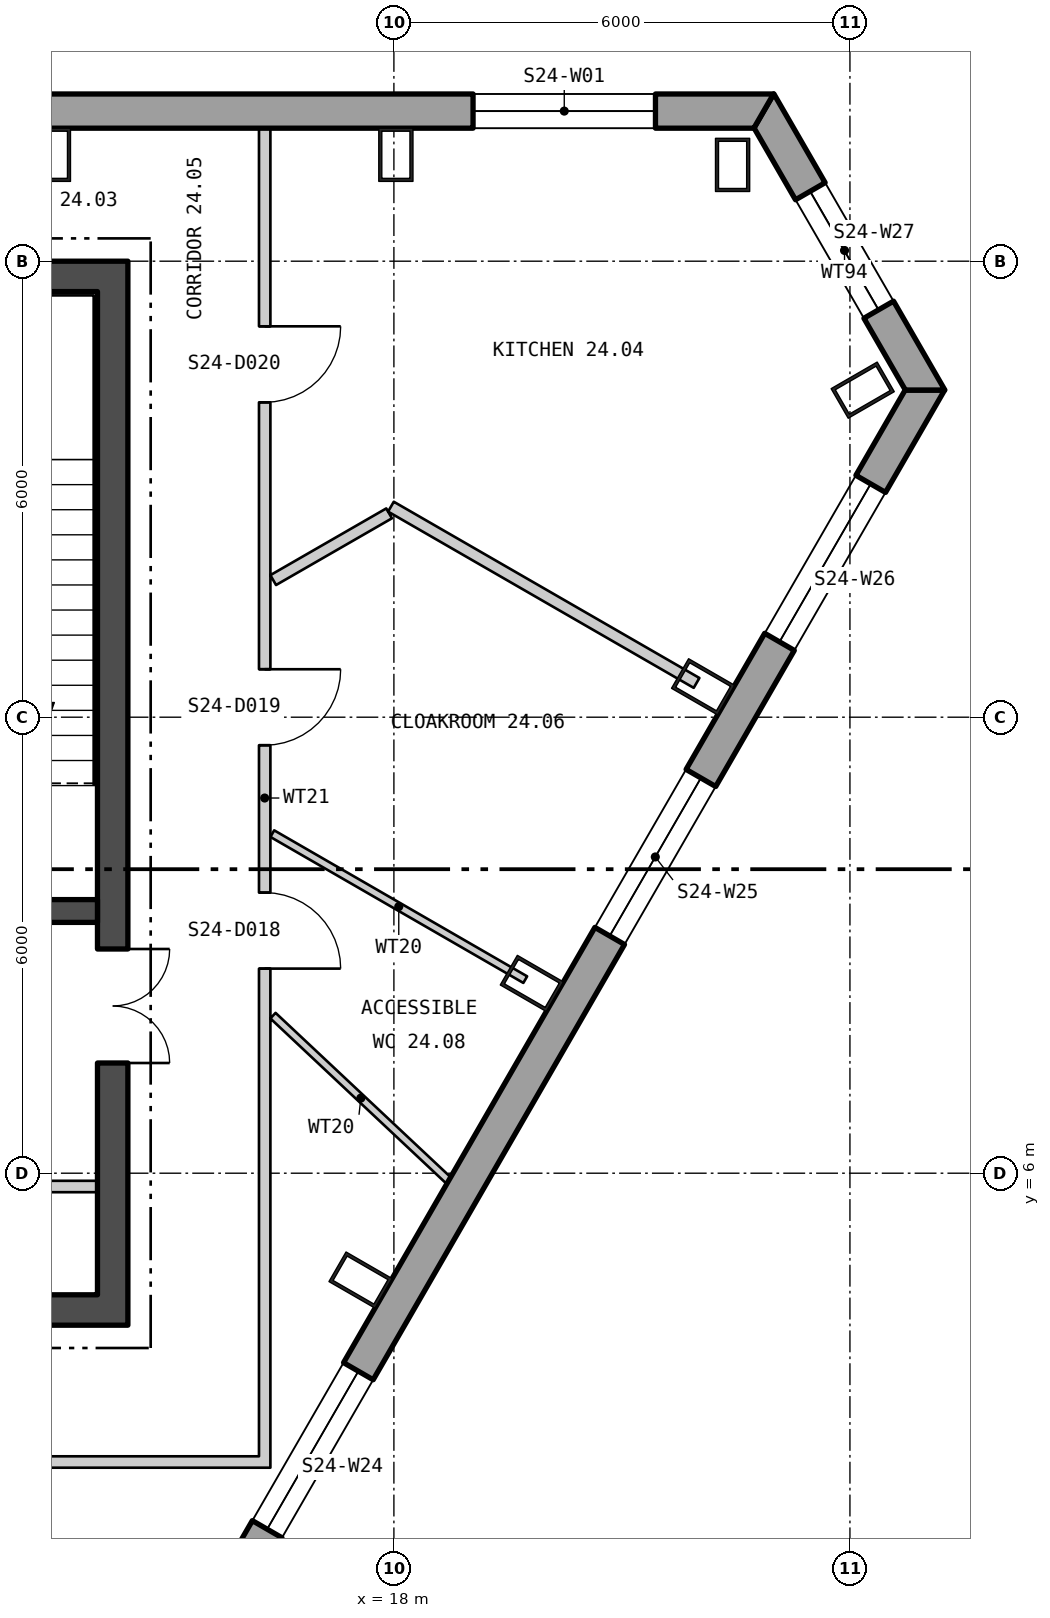
"""IFC4 building model, lengths in metres.
Left out: names, types, materials, properties, quantities, classifications, styles, units other than length and angle.
Written with IfcOpenShell. Run it as: python <this file> out.ifc"""

import sys

from ifc_helpers import new_model, si_unit, direction, frame, frame_2d, origin, origin_2d, place, context, subcontext, project, spatial, polyline, rectangle, hollow_rectangle, outline, extrude, element, fill, save


model = new_model("IFC4")
c1 = context("Model", 3, precision=1e-05, world=origin(), true_north=direction((0.0, 1.0)))
c2 = subcontext(c1, "Body", "Model", "MODEL_VIEW")
j1 = project(units=[si_unit("LENGTHUNIT", "METRE"), si_unit("PLANEANGLEUNIT", "RADIAN")], contexts=[c1])
p1 = place(None, origin())
s1 = spatial("IfcSite", under=j1, at=p1, CompositionType="ELEMENT")
p2 = place(p1, origin())
s2 = spatial("IfcBuilding", under=s1, at=p2, CompositionType="ELEMENT")
p3 = place(p2, frame((0.0, 0.0, 312.6)))
s3 = spatial("IfcBuildingStorey", under=s2, at=p3, CompositionType="ELEMENT", Elevation=312.6)
for number, where, z_axis, x_axis in (
    (1, (22.456, 19.267, 0.0), (0.0, 0.0, 1.0), (-1.0, 0.0, 0.0)),
    (2, (18.026, 19.4, 0.0), (0.0, 0.0, 1.0), (-1.0, 0.0, 0.0)),
    (3, (13.52, 19.4, 0.0), (0.0, 0.0, 1.0), (-1.0, 0.0, 0.0)),
    (4, (17.561, 4.594, 0.0), (0.0, 0.0, 1.0), (0.5, 0.866, 0.0)),
    (5, (19.815, 8.497, 0.0), (0.0, 0.0, 1.0), (0.5, 0.866, 0.0)),
    (6, (22.068, 12.4, 0.0), (0.0, 0.0, 1.0), (0.5, 0.866, 0.0)),
    (7, (24.168, 16.303, 0.0), (0.0, 0.0, 1.0), (-0.5, 0.866, 0.0)),
):
    element("IfcColumn", number, at=place(p3, frame(where, z_axis=z_axis, x_axis=x_axis)), inside=s3, PredefinedType="COLUMN", context=c2, shape_type="SweptSolid", body=[
        extrude(hollow_rectangle(XDim=0.45, YDim=0.7, WallThickness=0.04, at=origin_2d()), origin(), (0.0, 0.0, 1.0), 4.2),
    ])
p4 = place(p3, frame((22.865, 19.975, -0.4), z_axis=(0.0, 0.0, 1.0), x_axis=(-1.0, 0.0, 0.0)))
e8 = element("IfcWall", 8, at=p4, inside=s3, PredefinedType="SOLIDWALL", context=c2, shape_type="SweptSolid", body=[
    extrude(outline(polyline([(-0.13, -0.225), (45.86, -0.225), (45.6, 0.225), (0.13, 0.225), (-0.13, -0.225)])), origin(), (0.0, 0.0, 1.0), 4.2),
])
p5 = place(p4, frame((1.424, 0.0, 1.3)))
e9 = element("IfcOpeningElement", 9, at=p5, cuts=e8, PredefinedType="OPENING", context=c2, shape_type="SweptSolid", body=[
    extrude(rectangle(XDim=2.4, YDim=2.3, at=frame_2d((1.2, 1.15))), frame((0.0, 0.235, 0.0), z_axis=(0.0, -1.0, 0.0), x_axis=(1.0, 0.0, 0.0)), (0.0, 0.0, 1.0), 0.47),
])
p6 = place(p4, frame((14.905, 0.0, 1.3)))
e10 = element("IfcOpeningElement", 10, at=p6, cuts=e8, PredefinedType="OPENING", context=c2, shape_type="SweptSolid", body=[
    extrude(rectangle(XDim=2.4, YDim=2.3, at=frame_2d((1.2, 1.15))), frame((0.0, 0.235, 0.0), z_axis=(0.0, -1.0, 0.0), x_axis=(1.0, 0.0, 0.0)), (0.0, 0.0, 1.0), 0.47),
])
p7 = place(p4, frame((19.412, 0.0, 1.3)))
e11 = element("IfcOpeningElement", 11, at=p7, cuts=e8, PredefinedType="OPENING", context=c2, shape_type="SweptSolid", body=[
    extrude(rectangle(XDim=2.4, YDim=2.3, at=frame_2d((1.2, 1.15))), frame((0.0, 0.235, 0.0), z_axis=(0.0, -1.0, 0.0), x_axis=(1.0, 0.0, 0.0)), (0.0, 0.0, 1.0), 0.47),
])
p8 = place(p4, frame((23.918, 0.0, 1.3)))
e12 = element("IfcOpeningElement", 12, at=p8, cuts=e8, PredefinedType="OPENING", context=c2, shape_type="SweptSolid", body=[
    extrude(rectangle(XDim=2.4, YDim=2.3, at=frame_2d((1.2, 1.15))), frame((0.0, 0.235, 0.0), z_axis=(0.0, -1.0, 0.0), x_axis=(1.0, 0.0, 0.0)), (0.0, 0.0, 1.0), 0.47),
])
p9 = place(p4, frame((28.425, 0.0, 1.3)))
e13 = element("IfcOpeningElement", 13, at=p9, cuts=e8, PredefinedType="OPENING", context=c2, shape_type="SweptSolid", body=[
    extrude(rectangle(XDim=2.4, YDim=2.3, at=frame_2d((1.2, 1.15))), frame((0.0, 0.235, 0.0), z_axis=(0.0, -1.0, 0.0), x_axis=(1.0, 0.0, 0.0)), (0.0, 0.0, 1.0), 0.47),
])
p10 = place(p4, frame((32.932, 0.0, 1.3)))
e14 = element("IfcOpeningElement", 14, at=p10, cuts=e8, PredefinedType="OPENING", context=c2, shape_type="SweptSolid", body=[
    extrude(rectangle(XDim=2.4, YDim=2.3, at=frame_2d((1.2, 1.15))), frame((0.0, 0.235, 0.0), z_axis=(0.0, -1.0, 0.0), x_axis=(1.0, 0.0, 0.0)), (0.0, 0.0, 1.0), 0.47),
])
p11 = place(p4, frame((41.907, 0.0, 1.3)))
e15 = element("IfcOpeningElement", 15, at=p11, cuts=e8, PredefinedType="OPENING", context=c2, shape_type="SweptSolid", body=[
    extrude(rectangle(XDim=2.4, YDim=2.3, at=frame_2d((1.2, 1.15))), frame((0.0, 0.235, 0.0), z_axis=(0.0, -1.0, 0.0), x_axis=(1.0, 0.0, 0.0)), (0.0, 0.0, 1.0), 0.47),
])
p12 = place(p3, frame((2.12, -23.301, -0.18), z_axis=(0.0, 0.0, 1.0), x_axis=(0.500000141277, 0.866025322218, 0.0)))
e16 = element("IfcWall", 16, at=p12, inside=s3, PredefinedType="SOLIDWALL", context=c2, shape_type="SweptSolid", body=[
    extrude(outline(polyline([(-0.13, -0.225), (45.86, -0.225), (45.6, 0.225), (0.13, 0.225), (-0.13, -0.225)])), origin(), (0.0, 0.0, 1.0), 3.98),
])
p13 = place(p12, frame((1.424, 0.0, 1.08)))
e17 = element("IfcOpeningElement", 17, at=p13, cuts=e16, PredefinedType="OPENING", context=c2, shape_type="SweptSolid", body=[
    extrude(rectangle(XDim=2.4, YDim=2.3, at=frame_2d((1.2, 1.15))), frame((0.0, 0.235, 0.0), z_axis=(0.0, -1.0, 0.0), x_axis=(1.0, 0.0, 0.0)), (0.0, 0.0, 1.0), 0.47),
])
p14 = place(p12, frame((5.892, 0.0, 1.08)))
e18 = element("IfcOpeningElement", 18, at=p14, cuts=e16, PredefinedType="OPENING", context=c2, shape_type="SweptSolid", body=[
    extrude(rectangle(XDim=2.4, YDim=2.3, at=frame_2d((1.2, 1.15))), frame((0.0, 0.235, 0.0), z_axis=(0.0, -1.0, 0.0), x_axis=(1.0, 0.0, 0.0)), (0.0, 0.0, 1.0), 0.47),
])
p15 = place(p12, frame((14.905, 0.0, 1.08)))
e19 = element("IfcOpeningElement", 19, at=p15, cuts=e16, PredefinedType="OPENING", context=c2, shape_type="SweptSolid", body=[
    extrude(rectangle(XDim=2.4, YDim=2.3, at=frame_2d((1.2, 1.15))), frame((0.0, 0.235, 0.0), z_axis=(0.0, -1.0, 0.0), x_axis=(1.0, 0.0, 0.0)), (0.0, 0.0, 1.0), 0.47),
])
p16 = place(p12, frame((19.412, 0.0, 1.08)))
e20 = element("IfcOpeningElement", 20, at=p16, cuts=e16, PredefinedType="OPENING", context=c2, shape_type="SweptSolid", body=[
    extrude(rectangle(XDim=2.4, YDim=2.3, at=frame_2d((1.2, 1.15))), frame((0.0, 0.235, 0.0), z_axis=(0.0, -1.0, 0.0), x_axis=(1.0, 0.0, 0.0)), (0.0, 0.0, 1.0), 0.47),
])
p17 = place(p12, frame((23.918, 0.0, 1.08)))
e21 = element("IfcOpeningElement", 21, at=p17, cuts=e16, PredefinedType="OPENING", context=c2, shape_type="SweptSolid", body=[
    extrude(rectangle(XDim=2.4, YDim=2.3, at=frame_2d((1.2, 1.15))), frame((0.0, 0.235, 0.0), z_axis=(0.0, -1.0, 0.0), x_axis=(1.0, 0.0, 0.0)), (0.0, 0.0, 1.0), 0.47),
])
p18 = place(p12, frame((28.425, 0.0, 1.08)))
e22 = element("IfcOpeningElement", 22, at=p18, cuts=e16, PredefinedType="OPENING", context=c2, shape_type="SweptSolid", body=[
    extrude(rectangle(XDim=2.4, YDim=2.3, at=frame_2d((1.2, 1.15))), frame((0.0, 0.235, 0.0), z_axis=(0.0, -1.0, 0.0), x_axis=(1.0, 0.0, 0.0)), (0.0, 0.0, 1.0), 0.47),
])
p19 = place(p12, frame((37.438, 0.0, 1.08)))
e23 = element("IfcOpeningElement", 23, at=p19, cuts=e16, PredefinedType="OPENING", context=c2, shape_type="SweptSolid", body=[
    extrude(rectangle(XDim=2.4, YDim=2.3, at=frame_2d((1.2, 1.15))), frame((0.0, 0.235, 0.0), z_axis=(0.0, -1.0, 0.0), x_axis=(1.0, 0.0, 0.0)), (0.0, 0.0, 1.0), 0.47),
])
p20 = place(p12, frame((41.907, 0.0, 1.08)))
e24 = element("IfcOpeningElement", 24, at=p20, cuts=e16, PredefinedType="OPENING", context=c2, shape_type="SweptSolid", body=[
    extrude(rectangle(XDim=2.4, YDim=2.3, at=frame_2d((1.2, 1.15))), frame((0.0, 0.235, 0.0), z_axis=(0.0, -1.0, 0.0), x_axis=(1.0, 0.0, 0.0)), (0.0, 0.0, 1.0), 0.47),
])
p21 = place(p3, frame((24.989, 16.305, -0.4), z_axis=(0.0, 0.0, 1.0), x_axis=(-0.500002136082, 0.866024170514, 0.0)))
e25 = element("IfcWall", 25, at=p21, inside=s3, PredefinedType="SOLIDWALL", context=c2, shape_type="SweptSolid", body=[
    extrude(outline(polyline([(-0.13, -0.225), (4.37, -0.225), (4.11, 0.225), (0.13, 0.225), (-0.13, -0.225)])), origin(), (0.0, 0.0, 1.0), 4.2),
])
p22 = place(p21, frame((1.22, 0.0, 1.3)))
e26 = element("IfcOpeningElement", 26, at=p22, cuts=e25, PredefinedType="OPENING", context=c2, shape_type="SweptSolid", body=[
    extrude(rectangle(XDim=1.8, YDim=2.3, at=frame_2d((0.9, 1.15))), frame((0.0, 0.235, 0.0), z_axis=(0.0, -1.0, 0.0), x_axis=(1.0, 0.0, 0.0)), (0.0, 0.0, 1.0), 0.47),
])
p23 = place(p3, frame((-14.5, 4.2, 0.0), z_axis=(0.0, 0.0, 1.0), x_axis=(1.0, 0.0, 0.0)))
e27 = element("IfcWall", 27, at=p23, inside=s3, PredefinedType="SHEAR", context=c2, shape_type="SweptSolid", body=[
    extrude(rectangle(XDim=29.0, YDim=0.4, at=frame_2d((14.5, 0.0))), origin(), (0.0, 0.0, 1.0), 4.0),
])
p24 = place(p23, frame((9.0, 0.0, 0.0)))
e28 = element("IfcOpeningElement", 28, at=p24, cuts=e27, PredefinedType="OPENING", context=c2, shape_type="SweptSolid", body=[
    extrude(rectangle(XDim=1.8, YDim=2.4, at=frame_2d((0.9, 1.2))), frame((0.0, 0.21, 0.0), z_axis=(0.0, -1.0, 0.0), x_axis=(1.0, 0.0, 0.0)), (0.0, 0.0, 1.0), 0.42),
])
p25 = place(p23, frame((19.0, 0.0, 0.0)))
e29 = element("IfcOpeningElement", 29, at=p25, cuts=e27, PredefinedType="OPENING", context=c2, shape_type="SweptSolid", body=[
    extrude(rectangle(XDim=1.8, YDim=2.4, at=frame_2d((0.9, 1.2))), frame((0.0, 0.21, 0.0), z_axis=(0.0, -1.0, 0.0), x_axis=(1.0, 0.0, 0.0)), (0.0, 0.0, 1.0), 0.42),
])
p26 = place(p3, frame((-14.5, 17.8, 0.0), z_axis=(0.0, 0.0, 1.0), x_axis=(1.0, 0.0, 0.0)))
e30 = element("IfcWall", 30, at=p26, inside=s3, PredefinedType="SHEAR", context=c2, shape_type="SweptSolid", body=[
    extrude(rectangle(XDim=29.0, YDim=0.4, at=frame_2d((14.5, 0.0))), origin(), (0.0, 0.0, 1.0), 4.0),
])
p27 = place(p3, frame((14.3, 4.4, 0.0), z_axis=(0.0, 0.0, 1.0), x_axis=(0.0, 1.0, 0.0)))
e31 = element("IfcWall", 31, at=p27, inside=s3, PredefinedType="SHEAR", context=c2, shape_type="SweptSolid", body=[
    extrude(rectangle(XDim=13.2, YDim=0.4, at=frame_2d((6.6, 0.0))), origin(), (0.0, 0.0, 1.0), 4.0),
])
p28 = place(p27, frame((3.05, 0.0, 0.0)))
e32 = element("IfcOpeningElement", 32, at=p28, cuts=e31, PredefinedType="OPENING", context=c2, shape_type="SweptSolid", body=[
    extrude(rectangle(XDim=1.5, YDim=2.1, at=frame_2d((0.75, 1.05))), frame((0.0, 0.21, 0.0), z_axis=(0.0, -1.0, 0.0), x_axis=(1.0, 0.0, 0.0)), (0.0, 0.0, 1.0), 0.42),
])
p29 = place(p3, frame((11.0, 9.45, 0.0), z_axis=(0.0, 0.0, 1.0), x_axis=(1.0, 0.0, 0.0)))
e33 = element("IfcWall", 33, at=p29, inside=s3, PredefinedType="SHEAR", context=c2, shape_type="SweptSolid", body=[
    extrude(rectangle(XDim=3.1, YDim=0.3, at=frame_2d((1.55, 0.0))), origin(), (0.0, 0.0, 1.0), 4.0),
])
p30 = place(p29, frame((0.95, 0.0, 0.0)))
e34 = element("IfcOpeningElement", 34, at=p30, cuts=e33, PredefinedType="OPENING", context=c2, shape_type="SweptSolid", body=[
    extrude(rectangle(XDim=1.2, YDim=2.1, at=frame_2d((0.6, 1.05))), frame((0.0, 0.16, 0.0), z_axis=(0.0, -1.0, 0.0), x_axis=(1.0, 0.0, 0.0)), (0.0, 0.0, 1.0), 0.32),
])
p31 = place(p3, frame((11.0, 5.825, 0.0), z_axis=(0.0, 0.0, 1.0), x_axis=(1.0, 0.0, 0.0)))
e35 = element("IfcWall", 35, at=p31, inside=s3, PredefinedType="PARTITIONING", context=c2, shape_type="SweptSolid", body=[
    extrude(rectangle(XDim=3.1, YDim=0.15, at=frame_2d((1.55, 0.0))), origin(), (0.0, 0.0, 1.0), 4.0),
])
p32 = place(p3, frame((7.595, 2.2, 0.0), z_axis=(0.0, 0.0, 1.0), x_axis=(1.0, 0.0, 0.0)))
e36 = element("IfcWall", 36, at=p32, inside=s3, PredefinedType="PARTITIONING", context=c2, shape_type="SweptSolid", body=[
    extrude(rectangle(XDim=8.63, YDim=0.15, at=frame_2d((4.315, 0.0))), origin(), (0.0, 0.0, 1.0), 4.0),
])
p33 = place(p32, frame((3.815, 0.0, 0.0)))
e37 = element("IfcOpeningElement", 37, at=p33, cuts=e36, PredefinedType="OPENING", context=c2, shape_type="SweptSolid", body=[
    extrude(rectangle(XDim=1.0, YDim=2.1, at=frame_2d((0.5, 1.05))), frame((0.0, 0.085, 0.0), z_axis=(0.0, -1.0, 0.0), x_axis=(1.0, 0.0, 0.0)), (0.0, 0.0, 1.0), 0.17),
])
p34 = place(p3, frame((16.3, 2.125, 0.0), z_axis=(0.0, 0.0, 1.0), x_axis=(0.0, 1.0, 0.0)))
e38 = element("IfcWall", 38, at=p34, inside=s3, PredefinedType="PARTITIONING", context=c2, shape_type="SweptSolid", body=[
    extrude(rectangle(XDim=17.623, YDim=0.15, at=frame_2d((8.812, 0.0))), origin(), (0.0, 0.0, 1.0), 4.0),
])
p35 = place(p34, frame((6.567, 0.0, 0.0)))
e39 = element("IfcOpeningElement", 39, at=p35, cuts=e38, PredefinedType="OPENING", context=c2, shape_type="SweptSolid", body=[
    extrude(rectangle(XDim=1.0, YDim=2.1, at=frame_2d((0.5, 1.05))), frame((0.0, 0.085, 0.0), z_axis=(0.0, -1.0, 0.0), x_axis=(1.0, 0.0, 0.0)), (0.0, 0.0, 1.0), 0.17),
])
p36 = place(p34, frame((9.506, 0.0, 0.0)))
e40 = element("IfcOpeningElement", 40, at=p36, cuts=e38, PredefinedType="OPENING", context=c2, shape_type="SweptSolid", body=[
    extrude(rectangle(XDim=1.0, YDim=2.1, at=frame_2d((0.5, 1.05))), frame((0.0, 0.085, 0.0), z_axis=(0.0, -1.0, 0.0), x_axis=(1.0, 0.0, 0.0)), (0.0, 0.0, 1.0), 0.17),
])
p37 = place(p34, frame((14.018, 0.0, 0.0)))
e41 = element("IfcOpeningElement", 41, at=p37, cuts=e38, PredefinedType="OPENING", context=c2, shape_type="SweptSolid", body=[
    extrude(rectangle(XDim=1.0, YDim=2.1, at=frame_2d((0.5, 1.05))), frame((0.0, 0.085, 0.0), z_axis=(0.0, -1.0, 0.0), x_axis=(1.0, 0.0, 0.0)), (0.0, 0.0, 1.0), 0.17),
])
p38 = place(p3, frame((16.4, 10.468, 0.0), z_axis=(0.0, 0.0, 1.0), x_axis=(0.866072919292, -0.499917691695, 0.0)))
e42 = element("IfcWall", 42, at=p38, inside=s3, PredefinedType="PARTITIONING", context=c2, shape_type="SweptSolid", body=[
    extrude(rectangle(XDim=3.843, YDim=0.1, at=frame_2d((1.921, 0.0))), origin(), (0.0, 0.0, 1.0), 4.0),
])
p39 = place(p3, frame((16.409, 8.073, 0.0), z_axis=(0.0, 0.0, 1.0), x_axis=(0.729143686078, -0.684360639614, 0.0)))
e43 = element("IfcWall", 43, at=p39, inside=s3, PredefinedType="PARTITIONING", context=c2, shape_type="SweptSolid", body=[
    extrude(rectangle(XDim=3.171, YDim=0.1, at=frame_2d((1.585, 0.0))), origin(), (0.0, 0.0, 1.0), 4.0),
])
p40 = place(p3, frame((16.412, 13.804, 0.0), z_axis=(0.0, 0.0, 1.0), x_axis=(0.86662990323, 0.498951511499, 0.0)))
e44 = element("IfcWall", 44, at=p40, inside=s3, PredefinedType="PARTITIONING", context=c2, shape_type="SweptSolid", body=[
    extrude(rectangle(XDim=1.76, YDim=0.15, at=frame_2d((0.88, 0.0))), origin(), (0.0, 0.0, 1.0), 4.0),
])
p41 = place(p3, frame((17.961, 14.77, 0.0), z_axis=(0.0, 0.0, 1.0), x_axis=(0.866260894491, -0.499591896127, 0.0)))
e45 = element("IfcWall", 45, at=p41, inside=s3, PredefinedType="PARTITIONING", context=c2, shape_type="SweptSolid", body=[
    extrude(rectangle(XDim=4.642, YDim=0.15, at=frame_2d((2.321, 0.0))), origin(), (0.0, 0.0, 1.0), 4.0),
])
p42 = place(p5, origin())
e46 = element("IfcWindow", 46, at=p42, inside=s3, PartitioningType="SINGLE_PANEL", PredefinedType="WINDOW", context=c2, shape_type="SweptSolid", body=[
    extrude(rectangle(XDim=2.4, YDim=2.3, at=frame_2d((1.2, 1.15))), frame((0.0, 0.105, 0.0), z_axis=(0.0, -1.0, 0.0), x_axis=(1.0, 0.0, 0.0)), (0.0, 0.0, 1.0), 0.06),
])
fill(e9, e46)
p43 = place(p18, origin())
e47 = element("IfcWindow", 47, at=p43, inside=s3, PartitioningType="SINGLE_PANEL", PredefinedType="WINDOW", context=c2, shape_type="SweptSolid", body=[
    extrude(rectangle(XDim=2.4, YDim=2.3, at=frame_2d((1.2, 1.15))), frame((0.0, 0.105, 0.0), z_axis=(0.0, -1.0, 0.0), x_axis=(1.0, 0.0, 0.0)), (0.0, 0.0, 1.0), 0.06),
])
fill(e22, e47)
p44 = place(p19, origin())
e48 = element("IfcWindow", 48, at=p44, inside=s3, PartitioningType="SINGLE_PANEL", PredefinedType="WINDOW", context=c2, shape_type="SweptSolid", body=[
    extrude(rectangle(XDim=2.4, YDim=2.3, at=frame_2d((1.2, 1.15))), frame((0.0, 0.105, 0.0), z_axis=(0.0, -1.0, 0.0), x_axis=(1.0, 0.0, 0.0)), (0.0, 0.0, 1.0), 0.06),
])
fill(e23, e48)
p45 = place(p20, origin())
e49 = element("IfcWindow", 49, at=p45, inside=s3, PartitioningType="SINGLE_PANEL", PredefinedType="WINDOW", context=c2, shape_type="SweptSolid", body=[
    extrude(rectangle(XDim=2.4, YDim=2.3, at=frame_2d((1.2, 1.15))), frame((0.0, 0.105, 0.0), z_axis=(0.0, -1.0, 0.0), x_axis=(1.0, 0.0, 0.0)), (0.0, 0.0, 1.0), 0.06),
])
fill(e24, e49)
p46 = place(p22, origin())
e50 = element("IfcWindow", 50, at=p46, inside=s3, PartitioningType="SINGLE_PANEL", PredefinedType="WINDOW", context=c2, shape_type="SweptSolid", body=[
    extrude(rectangle(XDim=1.8, YDim=2.3, at=frame_2d((0.9, 1.15))), frame((0.0, 0.105, 0.0), z_axis=(0.0, -1.0, 0.0), x_axis=(1.0, 0.0, 0.0)), (0.0, 0.0, 1.0), 0.06),
])
fill(e26, e50)
p47 = place(p28, origin())
e51 = element("IfcDoor", 51, at=p47, inside=s3, OperationType="DOUBLE_DOOR_SINGLE_SWING", PredefinedType="DOOR", context=c2, shape_type="SweptSolid", body=[
    extrude(rectangle(XDim=1.5, YDim=2.1, at=frame_2d((0.75, 1.05))), frame((0.0, 0.025, 0.0), z_axis=(0.0, -1.0, 0.0), x_axis=(1.0, 0.0, 0.0)), (0.0, 0.0, 1.0), 0.05),
])
fill(e32, e51)
p48 = place(p35, origin())
e52 = element("IfcDoor", 52, at=p48, inside=s3, OperationType="SINGLE_SWING_LEFT", PredefinedType="DOOR", context=c2, shape_type="SweptSolid", body=[
    extrude(rectangle(XDim=1.0, YDim=2.1, at=frame_2d((0.5, 1.05))), frame((0.0, 0.025, 0.0), z_axis=(0.0, -1.0, 0.0), x_axis=(1.0, 0.0, 0.0)), (0.0, 0.0, 1.0), 0.05),
])
fill(e39, e52)
p49 = place(p36, origin())
e53 = element("IfcDoor", 53, at=p49, inside=s3, OperationType="SINGLE_SWING_RIGHT", PredefinedType="DOOR", context=c2, shape_type="SweptSolid", body=[
    extrude(rectangle(XDim=1.0, YDim=2.1, at=frame_2d((0.5, 1.05))), frame((0.0, 0.025, 0.0), z_axis=(0.0, -1.0, 0.0), x_axis=(1.0, 0.0, 0.0)), (0.0, 0.0, 1.0), 0.05),
])
fill(e40, e53)
p50 = place(p37, origin())
e54 = element("IfcDoor", 54, at=p50, inside=s3, OperationType="SINGLE_SWING_RIGHT", PredefinedType="DOOR", context=c2, shape_type="SweptSolid", body=[
    extrude(rectangle(XDim=1.0, YDim=2.1, at=frame_2d((0.5, 1.05))), frame((0.0, 0.025, 0.0), z_axis=(0.0, -1.0, 0.0), x_axis=(1.0, 0.0, 0.0)), (0.0, 0.0, 1.0), 0.05),
])
fill(e41, e54)
save(model, sys.argv[1])
